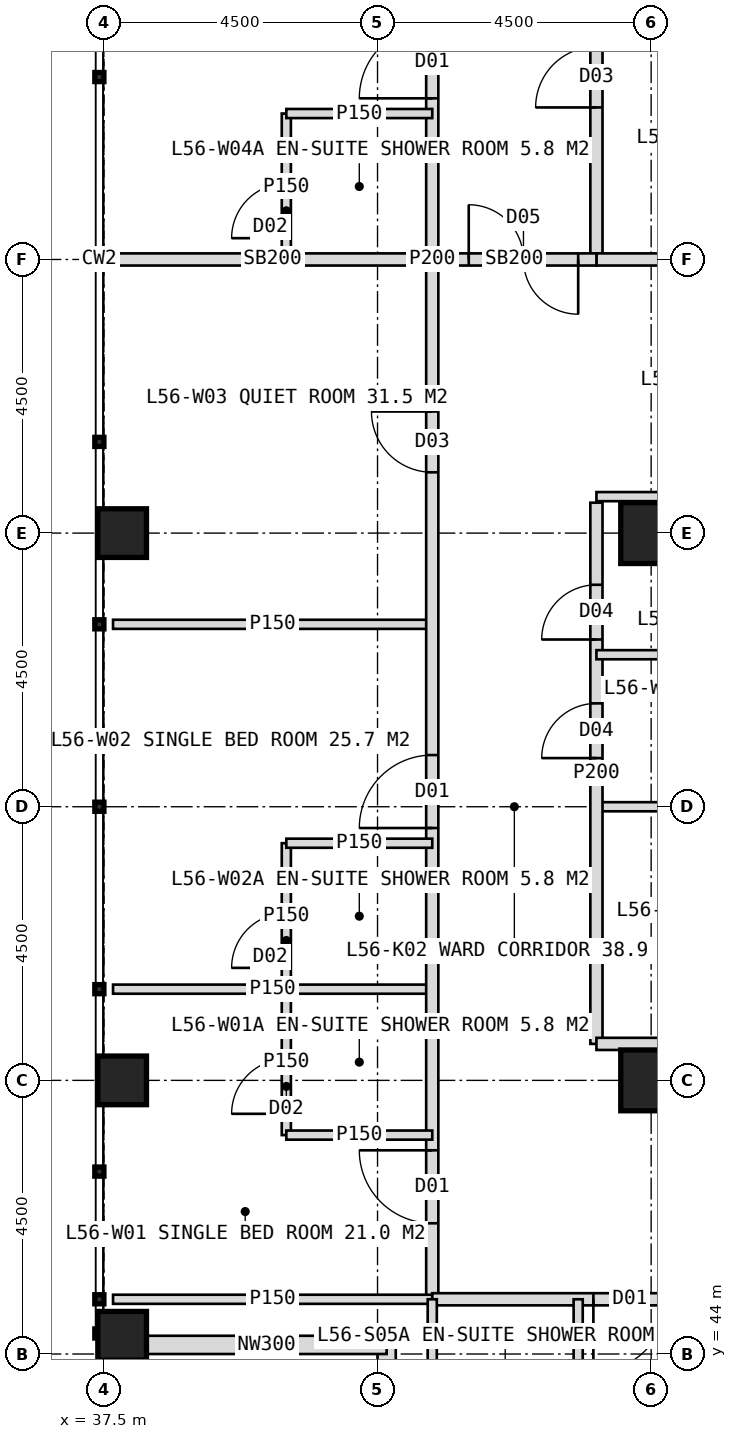
"""IFC4 building model, lengths in metres.
Left out: names, types, materials, properties, quantities, classifications, styles, units other than length and angle.
Written with IfcOpenShell. Run it as: python <this file> out.ifc"""

import sys

from ifc_helpers import new_model, si_unit, direction, frame, frame_2d, origin, origin_2d, place, context, subcontext, project, spatial, rectangle, hollow_rectangle, extrude, element, fill, save


model = new_model("IFC4")
c1 = context("Model", 3, precision=1e-05, world=origin(), true_north=direction((0.0, 1.0)))
c2 = subcontext(c1, "Body", "Model", "MODEL_VIEW")
j1 = project(units=[si_unit("LENGTHUNIT", "METRE"), si_unit("PLANEANGLEUNIT", "RADIAN")], contexts=[c1])
p1 = place(None, origin())
s1 = spatial("IfcSite", under=j1, at=p1, CompositionType="ELEMENT")
p2 = place(p1, origin())
s2 = spatial("IfcBuilding", under=s1, at=p2, CompositionType="ELEMENT")
p3 = place(p2, frame((0.0, 0.0, 233.0)))
s3 = spatial("IfcBuildingStorey", under=s2, at=p3, CompositionType="ELEMENT", Elevation=233.0)
for number, where, z_axis, x_axis in (
    (1, (46.5, 48.5, 0.0), (0.0, 0.0, 1.0), (1.0, 0.0, 0.0)),
    (2, (46.5, 57.5, 0.0), (0.0, 0.0, 1.0), (1.0, 0.0, 0.0)),
):
    element("IfcColumn", number, at=place(p3, frame(where, z_axis=z_axis, x_axis=x_axis)), inside=s3, PredefinedType="COLUMN", context=c2, shape_type="SweptSolid", body=[
        extrude(hollow_rectangle(XDim=1.0, YDim=1.0, WallThickness=0.1, at=origin_2d()), origin(), (0.0, 0.0, 1.0), 4.0),
    ])
for number, where, z_axis, x_axis in (
    (3, (37.8, 44.3, 0.0), (0.0, 0.0, 1.0), (1.0, 0.0, 0.0)),
    (4, (37.8, 48.5, 0.0), (0.0, 0.0, 1.0), (1.0, 0.0, 0.0)),
    (5, (37.8, 57.5, 0.0), (0.0, 0.0, 1.0), (1.0, 0.0, 0.0)),
):
    element("IfcColumn", number, at=place(p3, frame(where, z_axis=z_axis, x_axis=x_axis)), inside=s3, PredefinedType="COLUMN", context=c2, shape_type="SweptSolid", body=[
        extrude(hollow_rectangle(XDim=0.8, YDim=0.8, WallThickness=0.08, at=origin_2d()), origin(), (0.0, 0.0, 1.0), 4.0),
    ])
for number, where, z_axis, x_axis in (
    (6, (42.15, 40.2, 0.0), (0.0, 0.0, 1.0), (0.0, 1.0, 0.0)),
    (7, (42.15, 44.15, 0.0), (0.0, 0.0, 1.0), (-1.0, 0.0, 0.0)),
):
    element("IfcWall", number, at=place(p3, frame(where, z_axis=z_axis, x_axis=x_axis)), inside=s3, PredefinedType="ELEMENTEDWALL", context=c2, shape_type="SweptSolid", body=[
        extrude(rectangle(XDim=3.95, YDim=0.3, at=frame_2d((1.975, 0.0))), origin(), (0.0, 0.0, 1.0), 2.85),
    ])
for number, where, z_axis, x_axis in (
    (8, (42.9, 50.0, 0.0), (0.0, 0.0, 1.0), (-1.0, 0.0, 0.0)),
    (9, (42.9, 56.0, 0.0), (0.0, 0.0, 1.0), (-1.0, 0.0, 0.0)),
):
    element("IfcWall", number, at=place(p3, frame(where, z_axis=z_axis, x_axis=x_axis)), inside=s3, PredefinedType="PARTITIONING", context=c2, shape_type="SweptSolid", body=[
        extrude(rectangle(XDim=5.25, YDim=0.15, at=frame_2d((2.625, 0.0))), origin(), (0.0, 0.0, 1.0), 3.75),
    ])
p4 = place(p3, frame((42.9, 62.0, 0.0), z_axis=(0.0, 0.0, 1.0), x_axis=(-1.0, 0.0, 0.0)))
e10 = element("IfcWall", 10, at=p4, inside=s3, PredefinedType="SOLIDWALL", context=c2, shape_type="SweptSolid", body=[
    extrude(rectangle(XDim=5.25, YDim=0.2, at=frame_2d((2.625, 0.0))), origin(), (0.0, 0.0, 1.0), 2.95),
])
p5 = place(p3, frame((42.9, 44.9, 0.0), z_axis=(0.0, 0.0, 1.0), x_axis=(0.0, 1.0, 0.0)))
e11 = element("IfcWall", 11, at=p5, inside=s3, PredefinedType="PARTITIONING", context=c2, shape_type="SweptSolid", body=[
    extrude(rectangle(XDim=34.2, YDim=0.2, at=frame_2d((17.1, 0.0))), origin(), (0.0, 0.0, 1.0), 3.75),
])
p6 = place(p5, frame((1.25, 0.0, 0.0)))
e12 = element("IfcOpeningElement", 12, at=p6, cuts=e11, PredefinedType="OPENING", context=c2, shape_type="SweptSolid", body=[
    extrude(rectangle(XDim=1.2, YDim=2.2, at=frame_2d((0.6, 1.1))), frame((0.0, 0.11, 0.0), z_axis=(0.0, -1.0, 0.0), x_axis=(1.0, 0.0, 0.0)), (0.0, 0.0, 1.0), 0.22),
])
p7 = place(p5, frame((7.75, 0.0, 0.0)))
e13 = element("IfcOpeningElement", 13, at=p7, cuts=e11, PredefinedType="OPENING", context=c2, shape_type="SweptSolid", body=[
    extrude(rectangle(XDim=1.2, YDim=2.2, at=frame_2d((0.6, 1.1))), frame((0.0, 0.11, 0.0), z_axis=(0.0, -1.0, 0.0), x_axis=(1.0, 0.0, 0.0)), (0.0, 0.0, 1.0), 0.22),
])
p8 = place(p5, frame((13.6, 0.0, 0.0)))
e14 = element("IfcOpeningElement", 14, at=p8, cuts=e11, PredefinedType="OPENING", context=c2, shape_type="SweptSolid", body=[
    extrude(rectangle(XDim=1.0, YDim=2.1, at=frame_2d((0.5, 1.05))), frame((0.0, 0.11, 0.0), z_axis=(0.0, -1.0, 0.0), x_axis=(1.0, 0.0, 0.0)), (0.0, 0.0, 1.0), 0.22),
])
p9 = place(p5, frame((19.75, 0.0, 0.0)))
e15 = element("IfcOpeningElement", 15, at=p9, cuts=e11, PredefinedType="OPENING", context=c2, shape_type="SweptSolid", body=[
    extrude(rectangle(XDim=1.2, YDim=2.2, at=frame_2d((0.6, 1.1))), frame((0.0, 0.11, 0.0), z_axis=(0.0, -1.0, 0.0), x_axis=(1.0, 0.0, 0.0)), (0.0, 0.0, 1.0), 0.22),
])
p10 = place(p5, frame((30.35, 0.0, 0.0)))
e16 = element("IfcOpeningElement", 16, at=p10, cuts=e11, PredefinedType="OPENING", context=c2, shape_type="SweptSolid", body=[
    extrude(rectangle(XDim=1.2, YDim=2.2, at=frame_2d((0.6, 1.1))), frame((0.0, 0.11, 0.0), z_axis=(0.0, -1.0, 0.0), x_axis=(1.0, 0.0, 0.0)), (0.0, 0.0, 1.0), 0.22),
])
p11 = place(p3, frame((42.9, 44.9, 0.0), z_axis=(0.0, 0.0, 1.0), x_axis=(-1.0, 0.0, 0.0)))
e17 = element("IfcWall", 17, at=p11, inside=s3, PredefinedType="PARTITIONING", context=c2, shape_type="SweptSolid", body=[
    extrude(rectangle(XDim=5.25, YDim=0.15, at=frame_2d((2.625, 0.0))), origin(), (0.0, 0.0, 1.0), 3.75),
])
p12 = place(p3, frame((40.5, 47.6, 0.0), z_axis=(0.0, 0.0, 1.0), x_axis=(0.0, 1.0, 0.0)))
e18 = element("IfcWall", 18, at=p12, inside=s3, PredefinedType="PARTITIONING", context=c2, shape_type="SweptSolid", body=[
    extrude(rectangle(XDim=2.4, YDim=0.15, at=frame_2d((1.2, 0.0))), origin(), (0.0, 0.0, 1.0), 3.75),
])
p13 = place(p12, frame((0.35, 0.0, 0.0)))
e19 = element("IfcOpeningElement", 19, at=p13, cuts=e18, PredefinedType="OPENING", context=c2, shape_type="SweptSolid", body=[
    extrude(rectangle(XDim=0.9, YDim=2.1, at=frame_2d((0.45, 1.05))), frame((0.0, 0.085, 0.0), z_axis=(0.0, -1.0, 0.0), x_axis=(1.0, 0.0, 0.0)), (0.0, 0.0, 1.0), 0.17),
])
p14 = place(p3, frame((42.9, 47.6, 0.0), z_axis=(0.0, 0.0, 1.0), x_axis=(-1.0, 0.0, 0.0)))
e20 = element("IfcWall", 20, at=p14, inside=s3, PredefinedType="PARTITIONING", context=c2, shape_type="SweptSolid", body=[
    extrude(rectangle(XDim=2.4, YDim=0.15, at=frame_2d((1.2, 0.0))), origin(), (0.0, 0.0, 1.0), 3.75),
])
p15 = place(p3, frame((40.5, 50.0, 0.0), z_axis=(0.0, 0.0, 1.0), x_axis=(0.0, 1.0, 0.0)))
e21 = element("IfcWall", 21, at=p15, inside=s3, PredefinedType="PARTITIONING", context=c2, shape_type="SweptSolid", body=[
    extrude(rectangle(XDim=2.4, YDim=0.15, at=frame_2d((1.2, 0.0))), origin(), (0.0, 0.0, 1.0), 3.75),
])
p16 = place(p15, frame((0.35, 0.0, 0.0)))
e22 = element("IfcOpeningElement", 22, at=p16, cuts=e21, PredefinedType="OPENING", context=c2, shape_type="SweptSolid", body=[
    extrude(rectangle(XDim=0.9, YDim=2.1, at=frame_2d((0.45, 1.05))), frame((0.0, 0.085, 0.0), z_axis=(0.0, -1.0, 0.0), x_axis=(1.0, 0.0, 0.0)), (0.0, 0.0, 1.0), 0.17),
])
p17 = place(p3, frame((42.9, 52.4, 0.0), z_axis=(0.0, 0.0, 1.0), x_axis=(-1.0, 0.0, 0.0)))
e23 = element("IfcWall", 23, at=p17, inside=s3, PredefinedType="PARTITIONING", context=c2, shape_type="SweptSolid", body=[
    extrude(rectangle(XDim=2.4, YDim=0.15, at=frame_2d((1.2, 0.0))), origin(), (0.0, 0.0, 1.0), 3.75),
])
p18 = place(p3, frame((40.5, 62.0, 0.0), z_axis=(0.0, 0.0, 1.0), x_axis=(0.0, 1.0, 0.0)))
e24 = element("IfcWall", 24, at=p18, inside=s3, PredefinedType="PARTITIONING", context=c2, shape_type="SweptSolid", body=[
    extrude(rectangle(XDim=2.4, YDim=0.15, at=frame_2d((1.2, 0.0))), origin(), (0.0, 0.0, 1.0), 3.75),
])
p19 = place(p18, frame((0.35, 0.0, 0.0)))
e25 = element("IfcOpeningElement", 25, at=p19, cuts=e24, PredefinedType="OPENING", context=c2, shape_type="SweptSolid", body=[
    extrude(rectangle(XDim=0.9, YDim=2.1, at=frame_2d((0.45, 1.05))), frame((0.0, 0.085, 0.0), z_axis=(0.0, -1.0, 0.0), x_axis=(1.0, 0.0, 0.0)), (0.0, 0.0, 1.0), 0.17),
])
p20 = place(p3, frame((42.9, 64.4, 0.0), z_axis=(0.0, 0.0, 1.0), x_axis=(-1.0, 0.0, 0.0)))
e26 = element("IfcWall", 26, at=p20, inside=s3, PredefinedType="PARTITIONING", context=c2, shape_type="SweptSolid", body=[
    extrude(rectangle(XDim=2.4, YDim=0.15, at=frame_2d((1.2, 0.0))), origin(), (0.0, 0.0, 1.0), 3.75),
])
p21 = place(p3, frame((51.0, 53.0, 0.0), z_axis=(0.0, 0.0, 1.0), x_axis=(-1.0, 0.0, 0.0)))
e27 = element("IfcWall", 27, at=p21, inside=s3, PredefinedType="PARTITIONING", context=c2, shape_type="SweptSolid", body=[
    extrude(rectangle(XDim=5.4, YDim=0.15, at=frame_2d((2.7, 0.0))), origin(), (0.0, 0.0, 1.0), 3.75),
])
p22 = place(p3, frame((45.6, 49.1, 0.0), z_axis=(0.0, 0.0, 1.0), x_axis=(0.0, 1.0, 0.0)))
e28 = element("IfcWall", 28, at=p22, inside=s3, PredefinedType="PARTITIONING", context=c2, shape_type="SweptSolid", body=[
    extrude(rectangle(XDim=8.9, YDim=0.2, at=frame_2d((4.45, 0.0))), origin(), (0.0, 0.0, 1.0), 3.75),
])
p23 = place(p22, frame((4.7, 0.0, 0.0)))
e29 = element("IfcOpeningElement", 29, at=p23, cuts=e28, PredefinedType="OPENING", context=c2, shape_type="SweptSolid", body=[
    extrude(rectangle(XDim=0.9, YDim=2.1, at=frame_2d((0.45, 1.05))), frame((0.0, 0.11, 0.0), z_axis=(0.0, -1.0, 0.0), x_axis=(1.0, 0.0, 0.0)), (0.0, 0.0, 1.0), 0.22),
])
p24 = place(p22, frame((6.65, 0.0, 0.0)))
e30 = element("IfcOpeningElement", 30, at=p24, cuts=e28, PredefinedType="OPENING", context=c2, shape_type="SweptSolid", body=[
    extrude(rectangle(XDim=0.9, YDim=2.1, at=frame_2d((0.45, 1.05))), frame((0.0, 0.11, 0.0), z_axis=(0.0, -1.0, 0.0), x_axis=(1.0, 0.0, 0.0)), (0.0, 0.0, 1.0), 0.22),
])
p25 = place(p3, frame((45.6, 62.0, 0.0), z_axis=(0.0, 0.0, 1.0), x_axis=(0.0, 1.0, 0.0)))
e31 = element("IfcWall", 31, at=p25, inside=s3, PredefinedType="PARTITIONING", context=c2, shape_type="SweptSolid", body=[
    extrude(rectangle(XDim=14.4, YDim=0.2, at=frame_2d((7.2, 0.0))), origin(), (0.0, 0.0, 1.0), 3.75),
])
p26 = place(p25, frame((2.5, 0.0, 0.0)))
e32 = element("IfcOpeningElement", 32, at=p26, cuts=e31, PredefinedType="OPENING", context=c2, shape_type="SweptSolid", body=[
    extrude(rectangle(XDim=1.0, YDim=2.1, at=frame_2d((0.5, 1.05))), frame((0.0, 0.11, 0.0), z_axis=(0.0, -1.0, 0.0), x_axis=(1.0, 0.0, 0.0)), (0.0, 0.0, 1.0), 0.22),
])
p27 = place(p25, frame((7.0, 0.0, 0.0)))
e33 = element("IfcOpeningElement", 33, at=p27, cuts=e31, PredefinedType="OPENING", context=c2, shape_type="SweptSolid", body=[
    extrude(rectangle(XDim=1.0, YDim=2.1, at=frame_2d((0.5, 1.05))), frame((0.0, 0.11, 0.0), z_axis=(0.0, -1.0, 0.0), x_axis=(1.0, 0.0, 0.0)), (0.0, 0.0, 1.0), 0.22),
])
p28 = place(p25, frame((11.2, 0.0, 0.0)))
e34 = element("IfcOpeningElement", 34, at=p28, cuts=e31, PredefinedType="OPENING", context=c2, shape_type="SweptSolid", body=[
    extrude(rectangle(XDim=1.0, YDim=2.1, at=frame_2d((0.5, 1.05))), frame((0.0, 0.11, 0.0), z_axis=(0.0, -1.0, 0.0), x_axis=(1.0, 0.0, 0.0)), (0.0, 0.0, 1.0), 0.22),
])
p29 = place(p3, frame((51.0, 58.1, 0.0), z_axis=(0.0, 0.0, 1.0), x_axis=(-1.0, 0.0, 0.0)))
e35 = element("IfcWall", 35, at=p29, inside=s3, PredefinedType="PARTITIONING", context=c2, shape_type="SweptSolid", body=[
    extrude(rectangle(XDim=5.4, YDim=0.15, at=frame_2d((2.7, 0.0))), origin(), (0.0, 0.0, 1.0), 3.75),
])
p30 = place(p29, frame((0.6, 0.0, 0.0)))
e36 = element("IfcOpeningElement", 36, at=p30, cuts=e35, PredefinedType="OPENING", context=c2, shape_type="SweptSolid", body=[
    extrude(rectangle(XDim=0.9, YDim=2.1, at=frame_2d((0.45, 1.05))), frame((0.0, 0.085, 0.0), z_axis=(0.0, -1.0, 0.0), x_axis=(1.0, 0.0, 0.0)), (0.0, 0.0, 1.0), 0.17),
])
p31 = place(p3, frame((51.0, 62.0, 0.0), z_axis=(0.0, 0.0, 1.0), x_axis=(-1.0, 0.0, 0.0)))
e37 = element("IfcWall", 37, at=p31, inside=s3, PredefinedType="SOLIDWALL", context=c2, shape_type="SweptSolid", body=[
    extrude(rectangle(XDim=5.4, YDim=0.2, at=frame_2d((2.7, 0.0))), origin(), (0.0, 0.0, 1.0), 2.95),
])
p32 = place(p3, frame((51.0, 55.5, 0.0), z_axis=(0.0, 0.0, 1.0), x_axis=(-1.0, 0.0, 0.0)))
e38 = element("IfcWall", 38, at=p32, inside=s3, PredefinedType="PARTITIONING", context=c2, shape_type="SweptSolid", body=[
    extrude(rectangle(XDim=5.4, YDim=0.15, at=frame_2d((2.7, 0.0))), origin(), (0.0, 0.0, 1.0), 3.75),
])
p33 = place(p3, frame((77.1, 44.9, 0.0), z_axis=(0.0, 0.0, 1.0), x_axis=(-1.0, 0.0, 0.0)))
e39 = element("IfcWall", 39, at=p33, inside=s3, PredefinedType="PARTITIONING", context=c2, shape_type="SweptSolid", body=[
    extrude(rectangle(XDim=34.2, YDim=0.2, at=frame_2d((17.1, 0.0))), origin(), (0.0, 0.0, 1.0), 3.75),
])
p34 = place(p33, frame((1.25, 0.0, 0.0)))
e40 = element("IfcOpeningElement", 40, at=p34, cuts=e39, PredefinedType="OPENING", context=c2, shape_type="SweptSolid", body=[
    extrude(rectangle(XDim=1.2, YDim=2.2, at=frame_2d((0.6, 1.1))), frame((0.0, 0.11, 0.0), z_axis=(0.0, -1.0, 0.0), x_axis=(1.0, 0.0, 0.0)), (0.0, 0.0, 1.0), 0.22),
])
p35 = place(p33, frame((7.75, 0.0, 0.0)))
e41 = element("IfcOpeningElement", 41, at=p35, cuts=e39, PredefinedType="OPENING", context=c2, shape_type="SweptSolid", body=[
    extrude(rectangle(XDim=1.2, YDim=2.2, at=frame_2d((0.6, 1.1))), frame((0.0, 0.11, 0.0), z_axis=(0.0, -1.0, 0.0), x_axis=(1.0, 0.0, 0.0)), (0.0, 0.0, 1.0), 0.22),
])
p36 = place(p33, frame((13.25, 0.0, 0.0)))
e42 = element("IfcOpeningElement", 42, at=p36, cuts=e39, PredefinedType="OPENING", context=c2, shape_type="SweptSolid", body=[
    extrude(rectangle(XDim=1.2, YDim=2.2, at=frame_2d((0.6, 1.1))), frame((0.0, 0.11, 0.0), z_axis=(0.0, -1.0, 0.0), x_axis=(1.0, 0.0, 0.0)), (0.0, 0.0, 1.0), 0.22),
])
p37 = place(p33, frame((19.75, 0.0, 0.0)))
e43 = element("IfcOpeningElement", 43, at=p37, cuts=e39, PredefinedType="OPENING", context=c2, shape_type="SweptSolid", body=[
    extrude(rectangle(XDim=1.2, YDim=2.2, at=frame_2d((0.6, 1.1))), frame((0.0, 0.11, 0.0), z_axis=(0.0, -1.0, 0.0), x_axis=(1.0, 0.0, 0.0)), (0.0, 0.0, 1.0), 0.22),
])
p38 = place(p33, frame((30.35, 0.0, 0.0)))
e44 = element("IfcOpeningElement", 44, at=p38, cuts=e39, PredefinedType="OPENING", context=c2, shape_type="SweptSolid", body=[
    extrude(rectangle(XDim=1.2, YDim=2.2, at=frame_2d((0.6, 1.1))), frame((0.0, 0.11, 0.0), z_axis=(0.0, -1.0, 0.0), x_axis=(1.0, 0.0, 0.0)), (0.0, 0.0, 1.0), 0.22),
])
for number, where, z_axis, x_axis in (
    (45, (45.3, 44.9, 0.0), (0.0, 0.0, 1.0), (0.0, -1.0, 0.0)),
    (46, (42.9, 44.9, 0.0), (0.0, 0.0, 1.0), (0.0, -1.0, 0.0)),
):
    element("IfcWall", number, at=place(p3, frame(where, z_axis=z_axis, x_axis=x_axis)), inside=s3, PredefinedType="PARTITIONING", context=c2, shape_type="SweptSolid", body=[
        extrude(rectangle(XDim=2.4, YDim=0.15, at=frame_2d((1.2, 0.0))), origin(), (0.0, 0.0, 1.0), 3.75),
    ])
p39 = place(p3, frame((57.75, 49.1, 0.0), z_axis=(0.0, 0.0, 1.0), x_axis=(-1.0, 0.0, 0.0)))
e47 = element("IfcWall", 47, at=p39, inside=s3, PredefinedType="PARTITIONING", context=c2, shape_type="SweptSolid", body=[
    extrude(rectangle(XDim=12.15, YDim=0.2, at=frame_2d((6.075, 0.0))), origin(), (0.0, 0.0, 1.0), 3.75),
])
p40 = place(p39, frame((0.325, 0.0, 0.0)))
e48 = element("IfcOpeningElement", 48, at=p40, cuts=e47, PredefinedType="OPENING", context=c2, shape_type="SweptSolid", body=[
    extrude(rectangle(XDim=1.0, YDim=2.1, at=frame_2d((0.5, 1.05))), frame((0.0, 0.11, 0.0), z_axis=(0.0, -1.0, 0.0), x_axis=(1.0, 0.0, 0.0)), (0.0, 0.0, 1.0), 0.22),
])
p41 = place(p39, frame((5.5, 0.0, 0.0)))
e49 = element("IfcOpeningElement", 49, at=p41, cuts=e47, PredefinedType="OPENING", context=c2, shape_type="SweptSolid", body=[
    extrude(rectangle(XDim=1.0, YDim=2.1, at=frame_2d((0.5, 1.05))), frame((0.0, 0.11, 0.0), z_axis=(0.0, -1.0, 0.0), x_axis=(1.0, 0.0, 0.0)), (0.0, 0.0, 1.0), 0.22),
])
p42 = place(p39, frame((8.95, 0.0, 0.0)))
e50 = element("IfcOpeningElement", 50, at=p42, cuts=e47, PredefinedType="OPENING", context=c2, shape_type="SweptSolid", body=[
    extrude(rectangle(XDim=1.0, YDim=2.1, at=frame_2d((0.5, 1.05))), frame((0.0, 0.11, 0.0), z_axis=(0.0, -1.0, 0.0), x_axis=(1.0, 0.0, 0.0)), (0.0, 0.0, 1.0), 0.22),
])
p43 = place(p3, frame((45.6, 62.0, 0.0), z_axis=(0.0, 0.0, 1.0), x_axis=(-1.0, 0.0, 0.0)))
e51 = element("IfcWall", 51, at=p43, inside=s3, PredefinedType="SOLIDWALL", context=c2, shape_type="SweptSolid", body=[
    extrude(rectangle(XDim=2.7, YDim=0.2, at=frame_2d((1.35, 0.0))), origin(), (0.0, 0.0, 1.0), 2.95),
])
p44 = place(p43, frame((0.3, 0.0, 0.0)))
e52 = element("IfcOpeningElement", 52, at=p44, cuts=e51, PredefinedType="OPENING", context=c2, shape_type="SweptSolid", body=[
    extrude(rectangle(XDim=1.8, YDim=2.2, at=frame_2d((0.9, 1.1))), frame((0.0, 0.11, 0.0), z_axis=(0.0, -1.0, 0.0), x_axis=(1.0, 0.0, 0.0)), (0.0, 0.0, 1.0), 0.22),
])
p45 = place(p6, origin())
e53 = element("IfcDoor", 53, at=p45, inside=s3, OperationType="SINGLE_SWING_RIGHT", PredefinedType="DOOR", context=c2, shape_type="SweptSolid", body=[
    extrude(rectangle(XDim=1.2, YDim=2.2, at=frame_2d((0.6, 1.1))), frame((0.0, 0.025, 0.0), z_axis=(0.0, -1.0, 0.0), x_axis=(1.0, 0.0, 0.0)), (0.0, 0.0, 1.0), 0.05),
])
fill(e12, e53)
p46 = place(p13, origin())
e54 = element("IfcDoor", 54, at=p46, inside=s3, OperationType="SINGLE_SWING_LEFT", PredefinedType="DOOR", context=c2, shape_type="SweptSolid", body=[
    extrude(rectangle(XDim=0.9, YDim=2.1, at=frame_2d((0.45, 1.05))), frame((0.0, 0.025, 0.0), z_axis=(0.0, -1.0, 0.0), x_axis=(1.0, 0.0, 0.0)), (0.0, 0.0, 1.0), 0.05),
])
fill(e19, e54)
p47 = place(p7, origin())
e55 = element("IfcDoor", 55, at=p47, inside=s3, OperationType="SINGLE_SWING_LEFT", PredefinedType="DOOR", context=c2, shape_type="SweptSolid", body=[
    extrude(rectangle(XDim=1.2, YDim=2.2, at=frame_2d((0.6, 1.1))), frame((0.0, 0.025, 0.0), z_axis=(0.0, -1.0, 0.0), x_axis=(1.0, 0.0, 0.0)), (0.0, 0.0, 1.0), 0.05),
])
fill(e13, e55)
p48 = place(p16, origin())
e56 = element("IfcDoor", 56, at=p48, inside=s3, OperationType="SINGLE_SWING_LEFT", PredefinedType="DOOR", context=c2, shape_type="SweptSolid", body=[
    extrude(rectangle(XDim=0.9, YDim=2.1, at=frame_2d((0.45, 1.05))), frame((0.0, 0.025, 0.0), z_axis=(0.0, -1.0, 0.0), x_axis=(1.0, 0.0, 0.0)), (0.0, 0.0, 1.0), 0.05),
])
fill(e22, e56)
p49 = place(p8, origin())
e57 = element("IfcDoor", 57, at=p49, inside=s3, OperationType="SINGLE_SWING_RIGHT", PredefinedType="DOOR", context=c2, shape_type="SweptSolid", body=[
    extrude(rectangle(XDim=1.0, YDim=2.1, at=frame_2d((0.5, 1.05))), frame((0.0, 0.025, 0.0), z_axis=(0.0, -1.0, 0.0), x_axis=(1.0, 0.0, 0.0)), (0.0, 0.0, 1.0), 0.05),
])
fill(e14, e57)
p50 = place(p9, origin())
e58 = element("IfcDoor", 58, at=p50, inside=s3, OperationType="SINGLE_SWING_LEFT", PredefinedType="DOOR", context=c2, shape_type="SweptSolid", body=[
    extrude(rectangle(XDim=1.2, YDim=2.2, at=frame_2d((0.6, 1.1))), frame((0.0, 0.025, 0.0), z_axis=(0.0, -1.0, 0.0), x_axis=(1.0, 0.0, 0.0)), (0.0, 0.0, 1.0), 0.05),
])
fill(e15, e58)
p51 = place(p19, origin())
e59 = element("IfcDoor", 59, at=p51, inside=s3, OperationType="SINGLE_SWING_LEFT", PredefinedType="DOOR", context=c2, shape_type="SweptSolid", body=[
    extrude(rectangle(XDim=0.9, YDim=2.1, at=frame_2d((0.45, 1.05))), frame((0.0, 0.025, 0.0), z_axis=(0.0, -1.0, 0.0), x_axis=(1.0, 0.0, 0.0)), (0.0, 0.0, 1.0), 0.05),
])
fill(e25, e59)
p52 = place(p23, origin())
e60 = element("IfcDoor", 60, at=p52, inside=s3, OperationType="SINGLE_SWING_LEFT", PredefinedType="DOOR", context=c2, shape_type="SweptSolid", body=[
    extrude(rectangle(XDim=0.9, YDim=2.1, at=frame_2d((0.45, 1.05))), frame((0.0, 0.025, 0.0), z_axis=(0.0, -1.0, 0.0), x_axis=(1.0, 0.0, 0.0)), (0.0, 0.0, 1.0), 0.05),
])
fill(e29, e60)
p53 = place(p24, origin())
e61 = element("IfcDoor", 61, at=p53, inside=s3, OperationType="SINGLE_SWING_LEFT", PredefinedType="DOOR", context=c2, shape_type="SweptSolid", body=[
    extrude(rectangle(XDim=0.9, YDim=2.1, at=frame_2d((0.45, 1.05))), frame((0.0, 0.025, 0.0), z_axis=(0.0, -1.0, 0.0), x_axis=(1.0, 0.0, 0.0)), (0.0, 0.0, 1.0), 0.05),
])
fill(e30, e61)
p54 = place(p26, origin())
e62 = element("IfcDoor", 62, at=p54, inside=s3, OperationType="SINGLE_SWING_LEFT", PredefinedType="DOOR", context=c2, shape_type="SweptSolid", body=[
    extrude(rectangle(XDim=1.0, YDim=2.1, at=frame_2d((0.5, 1.05))), frame((0.0, 0.025, 0.0), z_axis=(0.0, -1.0, 0.0), x_axis=(1.0, 0.0, 0.0)), (0.0, 0.0, 1.0), 0.05),
])
fill(e32, e62)
p55 = place(p38, origin())
e63 = element("IfcDoor", 63, at=p55, inside=s3, OperationType="SINGLE_SWING_RIGHT", PredefinedType="DOOR", context=c2, shape_type="SweptSolid", body=[
    extrude(rectangle(XDim=1.2, YDim=2.2, at=frame_2d((0.6, 1.1))), frame((0.0, 0.025, 0.0), z_axis=(0.0, -1.0, 0.0), x_axis=(1.0, 0.0, 0.0)), (0.0, 0.0, 1.0), 0.05),
])
fill(e44, e63)
p56 = place(p44, origin())
e64 = element("IfcDoor", 64, at=p56, inside=s3, OperationType="DOUBLE_DOOR_DOUBLE_SWING", PredefinedType="DOOR", context=c2, shape_type="SweptSolid", body=[
    extrude(rectangle(XDim=1.8, YDim=2.2, at=frame_2d((0.9, 1.1))), frame((0.0, 0.025, 0.0), z_axis=(0.0, -1.0, 0.0), x_axis=(1.0, 0.0, 0.0)), (0.0, 0.0, 1.0), 0.05),
])
fill(e52, e64)
save(model, sys.argv[1])
